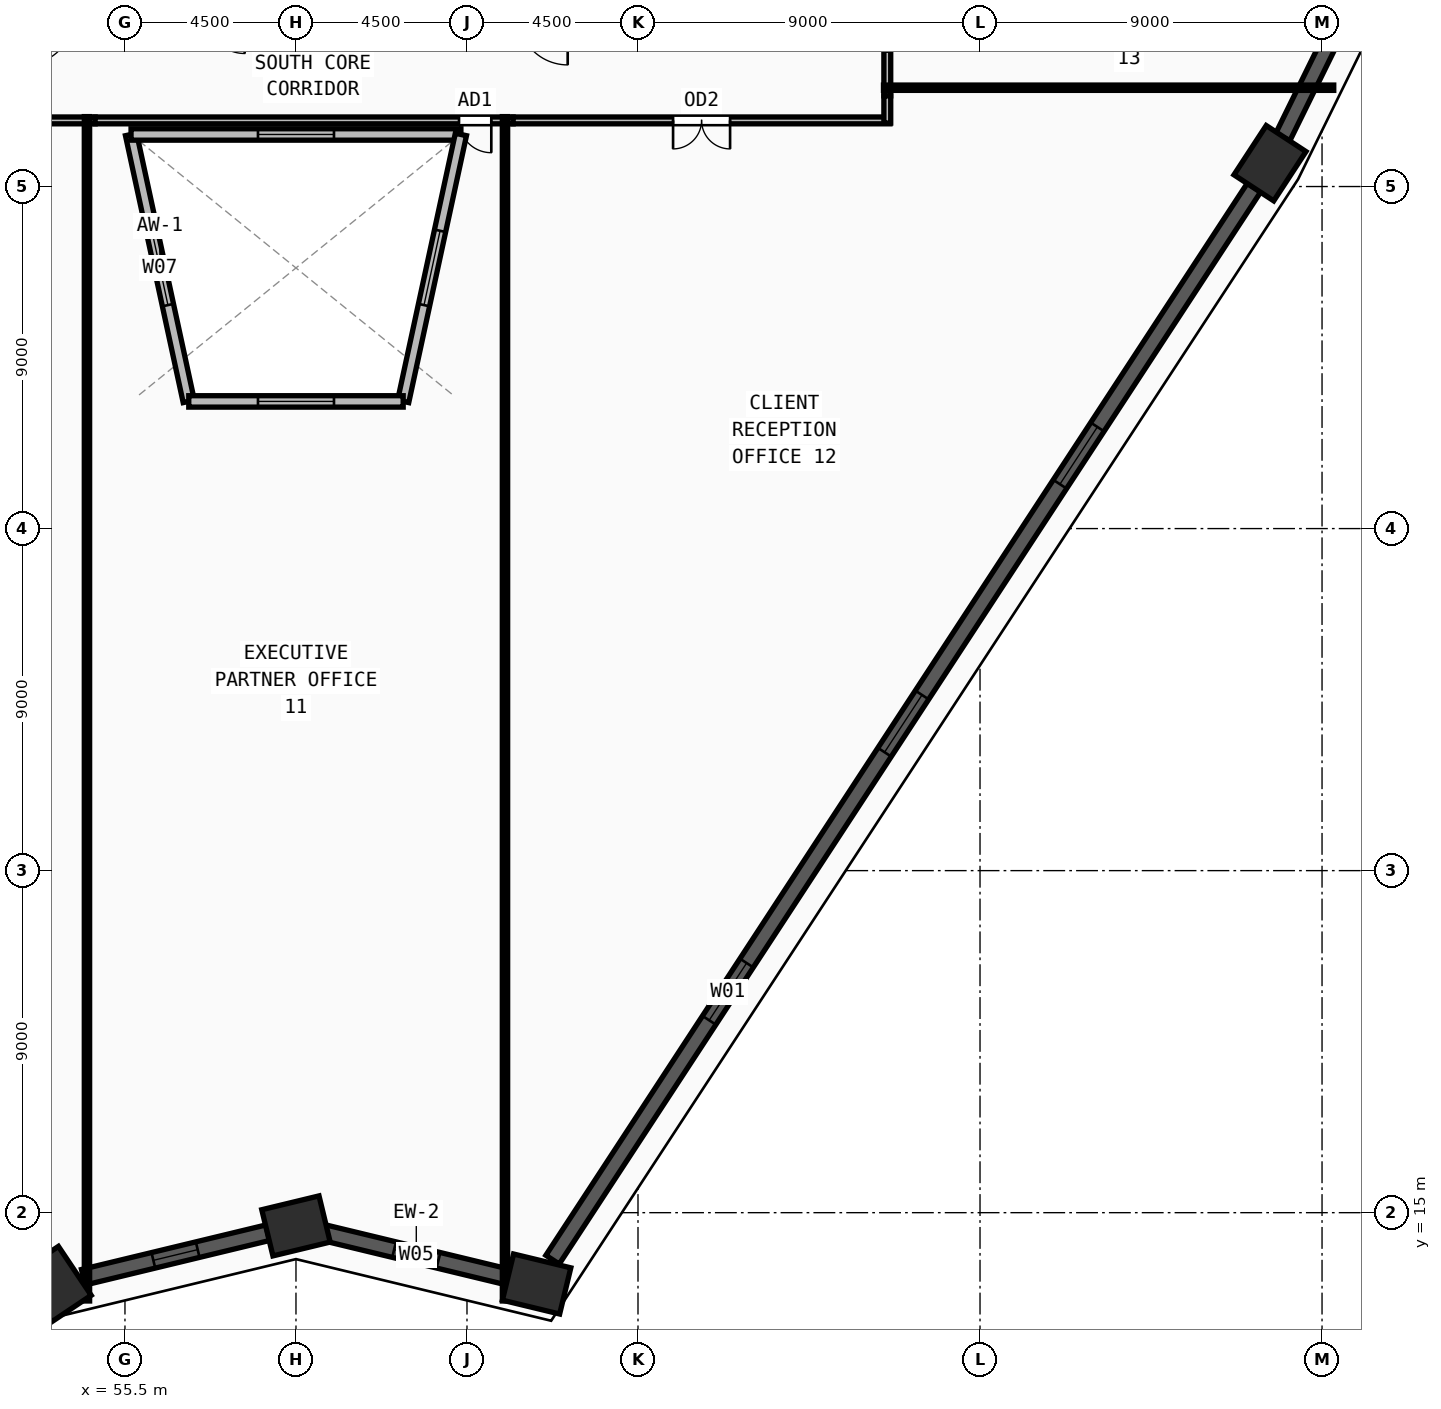
"""IFC4 building model, lengths in metres.
Left out: names, types, materials, properties, quantities, classifications, styles, units other than length and angle.
Written with IfcOpenShell. Run it as: python <this file> out.ifc"""

import sys

from ifc_helpers import new_model, si_unit, direction, frame, frame_2d, origin, origin_2d, place, context, subcontext, project, spatial, rectangle, extrude, source, transform, mapped, element, fill, save


model = new_model("IFC4")
c1 = context("Model", 3, precision=1e-05, world=origin(), true_north=direction((0.0, 1.0)))
c2 = subcontext(c1, "Body", "Model", "MODEL_VIEW")
j1 = project(units=[si_unit("LENGTHUNIT", "METRE"), si_unit("PLANEANGLEUNIT", "RADIAN")], contexts=[c1])
p1 = place(None, origin())
s1 = spatial("IfcSite", under=j1, at=p1, CompositionType="ELEMENT")
p2 = place(p1, origin())
s2 = spatial("IfcBuilding", under=s1, at=p2, CompositionType="ELEMENT")
p3 = place(p2, frame((0.0, 0.0, 51.75)))
s3 = spatial("IfcBuildingStorey", under=s2, at=p3, CompositionType="ELEMENT", Elevation=51.75)
m1 = source(origin(), c2, "Body", "SweptSolid", [
    extrude(rectangle(XDim=1.55, YDim=1.25, at=origin_2d()), origin(), (0.0, 0.0, 1.0), 3.75),
])
for number, where, z_axis, x_axis in (
    (1, (53.661, 13.121, 0.0), (0.0, 0.0, 1.0), (-0.557, 0.831, 0.0)),
    (2, (85.63, 42.614, 0.0), (0.0, 0.0, 1.0), (0.548, 0.837, 0.0)),
    (3, (66.332, 13.123, 0.0), (0.0, 0.0, 1.0), (-0.972, 0.235, 0.0)),
    (4, (60.0, 14.652, 0.0), (0.0, 0.0, 1.0), (0.972, 0.235, 0.0)),
):
    element("IfcColumn", number, at=place(p3, frame(where, z_axis=z_axis, x_axis=x_axis)), inside=s3, PredefinedType="COLUMN", context=c2, shape_type="MappedRepresentation", body=[
        mapped(m1, transform((0.0, 0.0, 0.0), x_axis=(1.0, 0.0, 0.0), y_axis=(0.0, 1.0, 0.0), z_axis=(0.0, 0.0, 1.0), scale=1.0)),
    ])
p4 = place(p3, frame((60.744, 14.472, 0.0), z_axis=(0.0, 0.0, 1.0), x_axis=(0.972095694159, -0.234584657207, 0.0)))
e5 = element("IfcWall", 5, at=p4, inside=s3, PredefinedType="SOLIDWALL", context=c2, shape_type="SweptSolid", body=[
    extrude(rectangle(XDim=4.983, YDim=0.42, at=frame_2d((2.492, 0.0))), origin(), (0.0, 0.0, 1.0), 3.57),
])
m2 = source(origin(), c2, "Body", "SweptSolid", [
    extrude(rectangle(XDim=1.2, YDim=1.9, at=frame_2d((0.6, 0.95))), frame((0.0, 0.22, 0.0), z_axis=(0.0, -1.0, 0.0), x_axis=(1.0, 0.0, 0.0)), (0.0, 0.0, 1.0), 0.44),
])
p5 = place(p4, frame((1.892, 0.0, 0.55)))
e6 = element("IfcOpeningElement", 6, at=p5, cuts=e5, PredefinedType="OPENING", context=c2, shape_type="MappedRepresentation", body=[
    mapped(m2, transform((0.0, 0.0, 0.0), x_axis=(1.0, 0.0, 0.0), y_axis=(0.0, 1.0, 0.0), z_axis=(0.0, 0.0, 1.0), scale=1.0)),
])
p6 = place(p3, frame((66.751, 13.763, 0.0), z_axis=(0.0, 0.0, 1.0), x_axis=(0.547544136791, 0.836776803135, 0.0)))
e7 = element("IfcWall", 7, at=p6, inside=s3, PredefinedType="SOLIDWALL", context=c2, shape_type="SweptSolid", body=[
    extrude(rectangle(XDim=33.714, YDim=0.42, at=frame_2d((16.857, 0.0))), origin(), (0.0, 0.0, 1.0), 3.57),
])
m3 = source(origin(), c2, "Body", "SweptSolid", [
    extrude(rectangle(XDim=1.8, YDim=1.95, at=frame_2d((0.9, 0.975))), frame((0.0, 0.22, 0.0), z_axis=(0.0, -1.0, 0.0), x_axis=(1.0, 0.0, 0.0)), (0.0, 0.0, 1.0), 0.44),
])
p7 = place(p6, frame((7.528, 0.0, 0.55)))
e8 = element("IfcOpeningElement", 8, at=p7, cuts=e7, PredefinedType="OPENING", context=c2, shape_type="MappedRepresentation", body=[
    mapped(m3, transform((0.0, 0.0, 0.0), x_axis=(1.0, 0.0, 0.0), y_axis=(0.0, 1.0, 0.0), z_axis=(0.0, 0.0, 1.0), scale=1.0)),
])
p8 = place(p6, frame((15.957, 0.0, 0.55)))
e9 = element("IfcOpeningElement", 9, at=p8, cuts=e7, PredefinedType="OPENING", context=c2, shape_type="MappedRepresentation", body=[
    mapped(m3, transform((0.0, 0.0, 0.0), x_axis=(1.0, 0.0, 0.0), y_axis=(0.0, 1.0, 0.0), z_axis=(0.0, 0.0, 1.0), scale=1.0)),
])
p9 = place(p6, frame((24.385, 0.0, 0.55)))
e10 = element("IfcOpeningElement", 10, at=p9, cuts=e7, PredefinedType="OPENING", context=c2, shape_type="MappedRepresentation", body=[
    mapped(m3, transform((0.0, 0.0, 0.0), x_axis=(1.0, 0.0, 0.0), y_axis=(0.0, 1.0, 0.0), z_axis=(0.0, 0.0, 1.0), scale=1.0)),
])
p10 = place(p3, frame((85.967, 43.301, 0.0), z_axis=(0.0, 0.0, 1.0), x_axis=(0.441079786623, 0.897467894597, 0.0)))
e11 = element("IfcWall", 11, at=p10, inside=s3, PredefinedType="SOLIDWALL", context=c2, shape_type="SweptSolid", body=[
    extrude(rectangle(XDim=27.814, YDim=0.42, at=frame_2d((13.907, 0.0))), origin(), (0.0, 0.0, 1.0), 3.57),
])
p11 = place(p10, frame((6.053, 0.0, 0.55)))
e12 = element("IfcOpeningElement", 12, at=p11, cuts=e11, PredefinedType="OPENING", context=c2, shape_type="MappedRepresentation", body=[
    mapped(m3, transform((0.0, 0.0, 0.0), x_axis=(1.0, 0.0, 0.0), y_axis=(0.0, 1.0, 0.0), z_axis=(0.0, 0.0, 1.0), scale=1.0)),
])
p12 = place(p10, frame((14.557, 0.0, 0.55)))
e13 = element("IfcOpeningElement", 13, at=p12, cuts=e11, PredefinedType="OPENING", context=c2, shape_type="MappedRepresentation", body=[
    mapped(m3, transform((0.0, 0.0, 0.0), x_axis=(1.0, 0.0, 0.0), y_axis=(0.0, 1.0, 0.0), z_axis=(0.0, 0.0, 1.0), scale=1.0)),
])
p13 = place(p10, frame((19.11, 0.0, 0.55)))
e14 = element("IfcOpeningElement", 14, at=p13, cuts=e11, PredefinedType="OPENING", context=c2, shape_type="MappedRepresentation", body=[
    mapped(m3, transform((0.0, 0.0, 0.0), x_axis=(1.0, 0.0, 0.0), y_axis=(0.0, 1.0, 0.0), z_axis=(0.0, 0.0, 1.0), scale=1.0)),
])
p14 = place(p3, frame((54.405, 13.301, 0.0), z_axis=(0.0, 0.0, 1.0), x_axis=(0.972084517215, 0.234630968524, 0.0)))
e15 = element("IfcWall", 15, at=p14, inside=s3, PredefinedType="SOLIDWALL", context=c2, shape_type="SweptSolid", body=[
    extrude(rectangle(XDim=4.99, YDim=0.42, at=frame_2d((2.495, 0.0))), origin(), (0.0, 0.0, 1.0), 3.57),
])
p15 = place(p14, frame((1.895, 0.0, 0.55)))
e16 = element("IfcOpeningElement", 16, at=p15, cuts=e15, PredefinedType="OPENING", context=c2, shape_type="MappedRepresentation", body=[
    mapped(m2, transform((0.0, 0.0, 0.0), x_axis=(1.0, 0.0, 0.0), y_axis=(0.0, 1.0, 0.0), z_axis=(0.0, 0.0, 1.0), scale=1.0)),
])
p16 = place(p3, frame((57.179, 36.346, 0.0), z_axis=(0.0, 0.0, 1.0), x_axis=(-0.211373141383, 0.977405440491, 0.0)))
e17 = element("IfcWall", 17, at=p16, inside=s3, PredefinedType="SOLIDWALL", context=c2, shape_type="SweptSolid", body=[
    extrude(rectangle(XDim=7.187, YDim=0.3, at=frame_2d((3.593, 0.0))), origin(), (0.0, 0.0, 1.0), 3.57),
])
m4 = source(origin(), c2, "Body", "SweptSolid", [
    extrude(rectangle(XDim=2.0, YDim=1.9, at=frame_2d((1.0, 0.95))), frame((0.0, 0.16, 0.0), z_axis=(0.0, -1.0, 0.0), x_axis=(1.0, 0.0, 0.0)), (0.0, 0.0, 1.0), 0.32),
])
p17 = place(p16, frame((2.593, 0.0, 0.55)))
e18 = element("IfcOpeningElement", 18, at=p17, cuts=e17, PredefinedType="OPENING", context=c2, shape_type="MappedRepresentation", body=[
    mapped(m4, transform((0.0, 0.0, 0.0), x_axis=(1.0, 0.0, 0.0), y_axis=(0.0, 1.0, 0.0), z_axis=(0.0, 0.0, 1.0), scale=1.0)),
])
p18 = place(p3, frame((55.66, 43.37, 0.0), z_axis=(0.0, 0.0, 1.0), x_axis=(1.0, 0.0, 0.0)))
e19 = element("IfcWall", 19, at=p18, inside=s3, PredefinedType="SOLIDWALL", context=c2, shape_type="SweptSolid", body=[
    extrude(rectangle(XDim=8.68, YDim=0.3, at=frame_2d((4.34, 0.0))), origin(), (0.0, 0.0, 1.0), 3.57),
])
p19 = place(p18, frame((3.34, 0.0, 0.55)))
e20 = element("IfcOpeningElement", 20, at=p19, cuts=e19, PredefinedType="OPENING", context=c2, shape_type="MappedRepresentation", body=[
    mapped(m4, transform((0.0, 0.0, 0.0), x_axis=(1.0, 0.0, 0.0), y_axis=(0.0, 1.0, 0.0), z_axis=(0.0, 0.0, 1.0), scale=1.0)),
])
p20 = place(p3, frame((64.34, 43.37, 0.0), z_axis=(0.0, 0.0, 1.0), x_axis=(-0.211373141383, -0.977405440491, 0.0)))
e21 = element("IfcWall", 21, at=p20, inside=s3, PredefinedType="SOLIDWALL", context=c2, shape_type="SweptSolid", body=[
    extrude(rectangle(XDim=7.187, YDim=0.3, at=frame_2d((3.593, 0.0))), origin(), (0.0, 0.0, 1.0), 3.57),
])
p21 = place(p20, frame((2.593, 0.0, 0.55)))
e22 = element("IfcOpeningElement", 22, at=p21, cuts=e21, PredefinedType="OPENING", context=c2, shape_type="MappedRepresentation", body=[
    mapped(m4, transform((0.0, 0.0, 0.0), x_axis=(1.0, 0.0, 0.0), y_axis=(0.0, 1.0, 0.0), z_axis=(0.0, 0.0, 1.0), scale=1.0)),
])
p22 = place(p3, frame((62.821, 36.346, 0.0), z_axis=(0.0, 0.0, 1.0), x_axis=(-1.0, 0.0, 0.0)))
e23 = element("IfcWall", 23, at=p22, inside=s3, PredefinedType="SOLIDWALL", context=c2, shape_type="SweptSolid", body=[
    extrude(rectangle(XDim=5.642, YDim=0.3, at=frame_2d((2.821, 0.0))), origin(), (0.0, 0.0, 1.0), 3.57),
])
p23 = place(p22, frame((1.821, 0.0, 0.55)))
e24 = element("IfcOpeningElement", 24, at=p23, cuts=e23, PredefinedType="OPENING", context=c2, shape_type="MappedRepresentation", body=[
    mapped(m4, transform((0.0, 0.0, 0.0), x_axis=(1.0, 0.0, 0.0), y_axis=(0.0, 1.0, 0.0), z_axis=(0.0, 0.0, 1.0), scale=1.0)),
])
p24 = place(p3, frame((54.715, 43.74, 0.0), z_axis=(0.0, 0.0, 1.0), x_axis=(-1.0, 0.0, 0.0)))
e25 = element("IfcWall", 25, at=p24, inside=s3, PredefinedType="PARTITIONING", context=c2, shape_type="SweptSolid", body=[
    extrude(rectangle(XDim=10.345, YDim=0.18, at=frame_2d((5.172, 0.0))), origin(), (0.0, 0.0, 1.0), 3.57),
])
m5 = source(origin(), c2, "Body", "SweptSolid", [
    extrude(rectangle(XDim=1.5, YDim=2.2, at=frame_2d((0.75, 1.1))), frame((0.0, 0.1, 0.0), z_axis=(0.0, -1.0, 0.0), x_axis=(1.0, 0.0, 0.0)), (0.0, 0.0, 1.0), 0.2),
])
p25 = place(p24, frame((4.423, 0.0, 0.0)))
e26 = element("IfcOpeningElement", 26, at=p25, cuts=e25, PredefinedType="OPENING", context=c2, shape_type="MappedRepresentation", body=[
    mapped(m5, transform((0.0, 0.0, 0.0), x_axis=(1.0, 0.0, 0.0), y_axis=(0.0, 1.0, 0.0), z_axis=(0.0, 0.0, 1.0), scale=1.0)),
])
p26 = place(p3, frame((65.715, 43.74, 0.0), z_axis=(0.0, 0.0, 1.0), x_axis=(-1.0, 0.0, 0.0)))
e27 = element("IfcWall", 27, at=p26, inside=s3, PredefinedType="PARTITIONING", context=c2, shape_type="SweptSolid", body=[
    extrude(rectangle(XDim=11.0, YDim=0.18, at=frame_2d((5.5, 0.0))), origin(), (0.0, 0.0, 1.0), 3.57),
])
m6 = source(origin(), c2, "Body", "SweptSolid", [
    extrude(rectangle(XDim=0.85, YDim=2.1, at=frame_2d((0.425, 1.05))), frame((0.0, 0.1, 0.0), z_axis=(0.0, -1.0, 0.0), x_axis=(1.0, 0.0, 0.0)), (0.0, 0.0, 1.0), 0.2),
])
p27 = place(p26, frame((0.575, 0.0, 0.0)))
e28 = element("IfcOpeningElement", 28, at=p27, cuts=e27, PredefinedType="OPENING", context=c2, shape_type="MappedRepresentation", body=[
    mapped(m6, transform((0.0, 0.0, 0.0), x_axis=(1.0, 0.0, 0.0), y_axis=(0.0, 1.0, 0.0), z_axis=(0.0, 0.0, 1.0), scale=1.0)),
])
p28 = place(p3, frame((75.63, 43.74, 0.0), z_axis=(0.0, 0.0, 1.0), x_axis=(-1.0, 0.0, 0.0)))
e29 = element("IfcWall", 29, at=p28, inside=s3, PredefinedType="PARTITIONING", context=c2, shape_type="SweptSolid", body=[
    extrude(rectangle(XDim=9.915, YDim=0.18, at=frame_2d((4.958, 0.0))), origin(), (0.0, 0.0, 1.0), 3.57),
])
p29 = place(p28, frame((4.207, 0.0, 0.0)))
e30 = element("IfcOpeningElement", 30, at=p29, cuts=e29, PredefinedType="OPENING", context=c2, shape_type="MappedRepresentation", body=[
    mapped(m5, transform((0.0, 0.0, 0.0), x_axis=(1.0, 0.0, 0.0), y_axis=(0.0, 1.0, 0.0), z_axis=(0.0, 0.0, 1.0), scale=1.0)),
])
p30 = place(p3, frame((75.56, 47.715, 0.0), z_axis=(0.0, 0.0, 1.0), x_axis=(0.0, -1.0, 0.0)))
e31 = element("IfcWall", 31, at=p30, inside=s3, PredefinedType="PARTITIONING", context=c2, shape_type="SweptSolid", body=[
    extrude(rectangle(XDim=3.33, YDim=0.18, at=frame_2d((1.665, 0.0))), origin(), (0.0, 0.0, 1.0), 3.57),
])
m7 = source(origin(), c2, "Body", "SweptSolid", [
    extrude(rectangle(XDim=1.0, YDim=2.2, at=frame_2d((0.5, 1.1))), frame((0.0, 0.1, 0.0), z_axis=(0.0, -1.0, 0.0), x_axis=(1.0, 0.0, 0.0)), (0.0, 0.0, 1.0), 0.2),
])
p31 = place(p30, frame((1.165, 0.0, 0.0)))
e32 = element("IfcOpeningElement", 32, at=p31, cuts=e31, PredefinedType="OPENING", context=c2, shape_type="MappedRepresentation", body=[
    mapped(m7, transform((0.0, 0.0, 0.0), x_axis=(1.0, 0.0, 0.0), y_axis=(0.0, 1.0, 0.0), z_axis=(0.0, 0.0, 1.0), scale=1.0)),
])
p32 = place(p3, frame((75.56, 44.385, 0.0), z_axis=(0.0, 0.0, 1.0), x_axis=(0.0, -1.0, 0.0)))
e33 = element("IfcWall", 33, at=p32, inside=s3, PredefinedType="PARTITIONING", context=c2, shape_type="SweptSolid", body=[
    extrude(rectangle(XDim=0.715, YDim=0.18, at=frame_2d((0.357, 0.0))), origin(), (0.0, 0.0, 1.0), 3.57),
])
p33 = place(p3, frame((75.46, 44.6, 0.0), z_axis=(0.0, 0.0, 1.0), x_axis=(1.0, 0.0, 0.0)))
e34 = element("IfcWall", 34, at=p33, inside=s3, PredefinedType="PARTITIONING", context=c2, shape_type="SweptSolid", body=[
    extrude(rectangle(XDim=11.848, YDim=0.14, at=frame_2d((5.924, 0.0))), origin(), (0.0, 0.0, 1.0), 2.705),
])
for number, where, z_axis, x_axis in (
    (35, (54.5, 43.84, 0.0), (0.0, 0.0, 1.0), (0.0, -1.0, 0.0)),
    (36, (65.5, 43.84, 0.0), (0.0, 0.0, 1.0), (0.0, -1.0, 0.0)),
):
    element("IfcWall", number, at=place(p3, frame(where, z_axis=z_axis, x_axis=x_axis)), inside=s3, PredefinedType="PARTITIONING", context=c2, shape_type="SweptSolid", body=[
        extrude(rectangle(XDim=31.164, YDim=0.14, at=frame_2d((15.582, 0.0))), origin(), (0.0, 0.0, 1.0), 3.57),
    ])
m8 = source(origin(), c2, "Body", "SweptSolid", [
    extrude(rectangle(XDim=1.2, YDim=1.9, at=frame_2d((0.6, 0.95))), frame((0.0, 0.03, 0.0), z_axis=(0.0, -1.0, 0.0), x_axis=(1.0, 0.0, 0.0)), (0.0, 0.0, 1.0), 0.06),
])
p34 = place(p5, origin())
e37 = element("IfcWindow", 37, at=p34, inside=s3, PartitioningType="SINGLE_PANEL", PredefinedType="WINDOW", context=c2, shape_type="MappedRepresentation", body=[
    mapped(m8, transform((0.0, 0.0, 0.0), x_axis=(1.0, 0.0, 0.0), y_axis=(0.0, 1.0, 0.0), z_axis=(0.0, 0.0, 1.0), scale=1.0)),
])
fill(e6, e37)
m9 = source(origin(), c2, "Body", "SweptSolid", [
    extrude(rectangle(XDim=1.8, YDim=1.95, at=frame_2d((0.9, 0.975))), frame((0.0, 0.03, 0.0), z_axis=(0.0, -1.0, 0.0), x_axis=(1.0, 0.0, 0.0)), (0.0, 0.0, 1.0), 0.06),
])
p35 = place(p7, origin())
e38 = element("IfcWindow", 38, at=p35, inside=s3, PartitioningType="DOUBLE_PANEL_VERTICAL", PredefinedType="WINDOW", context=c2, shape_type="MappedRepresentation", body=[
    mapped(m9, transform((0.0, 0.0, 0.0), x_axis=(1.0, 0.0, 0.0), y_axis=(0.0, 1.0, 0.0), z_axis=(0.0, 0.0, 1.0), scale=1.0)),
])
fill(e8, e38)
p36 = place(p8, origin())
e39 = element("IfcWindow", 39, at=p36, inside=s3, PartitioningType="DOUBLE_PANEL_VERTICAL", PredefinedType="WINDOW", context=c2, shape_type="MappedRepresentation", body=[
    mapped(m9, transform((0.0, 0.0, 0.0), x_axis=(1.0, 0.0, 0.0), y_axis=(0.0, 1.0, 0.0), z_axis=(0.0, 0.0, 1.0), scale=1.0)),
])
fill(e9, e39)
p37 = place(p9, origin())
e40 = element("IfcWindow", 40, at=p37, inside=s3, PartitioningType="DOUBLE_PANEL_VERTICAL", PredefinedType="WINDOW", context=c2, shape_type="MappedRepresentation", body=[
    mapped(m9, transform((0.0, 0.0, 0.0), x_axis=(1.0, 0.0, 0.0), y_axis=(0.0, 1.0, 0.0), z_axis=(0.0, 0.0, 1.0), scale=1.0)),
])
fill(e10, e40)
p38 = place(p15, origin())
e41 = element("IfcWindow", 41, at=p38, inside=s3, PartitioningType="SINGLE_PANEL", PredefinedType="WINDOW", context=c2, shape_type="MappedRepresentation", body=[
    mapped(m8, transform((0.0, 0.0, 0.0), x_axis=(1.0, 0.0, 0.0), y_axis=(0.0, 1.0, 0.0), z_axis=(0.0, 0.0, 1.0), scale=1.0)),
])
fill(e16, e41)
m10 = source(origin(), c2, "Body", "SweptSolid", [
    extrude(rectangle(XDim=2.0, YDim=1.9, at=frame_2d((1.0, 0.95))), frame((0.0, 0.03, 0.0), z_axis=(0.0, -1.0, 0.0), x_axis=(1.0, 0.0, 0.0)), (0.0, 0.0, 1.0), 0.06),
])
p39 = place(p17, origin())
e42 = element("IfcWindow", 42, at=p39, inside=s3, PartitioningType="DOUBLE_PANEL_VERTICAL", PredefinedType="WINDOW", context=c2, shape_type="MappedRepresentation", body=[
    mapped(m10, transform((0.0, 0.0, 0.0), x_axis=(1.0, 0.0, 0.0), y_axis=(0.0, 1.0, 0.0), z_axis=(0.0, 0.0, 1.0), scale=1.0)),
])
fill(e18, e42)
p40 = place(p19, origin())
e43 = element("IfcWindow", 43, at=p40, inside=s3, PartitioningType="DOUBLE_PANEL_VERTICAL", PredefinedType="WINDOW", context=c2, shape_type="MappedRepresentation", body=[
    mapped(m10, transform((0.0, 0.0, 0.0), x_axis=(1.0, 0.0, 0.0), y_axis=(0.0, 1.0, 0.0), z_axis=(0.0, 0.0, 1.0), scale=1.0)),
])
fill(e20, e43)
p41 = place(p21, origin())
e44 = element("IfcWindow", 44, at=p41, inside=s3, PartitioningType="DOUBLE_PANEL_VERTICAL", PredefinedType="WINDOW", context=c2, shape_type="MappedRepresentation", body=[
    mapped(m10, transform((0.0, 0.0, 0.0), x_axis=(1.0, 0.0, 0.0), y_axis=(0.0, 1.0, 0.0), z_axis=(0.0, 0.0, 1.0), scale=1.0)),
])
fill(e22, e44)
p42 = place(p23, origin())
e45 = element("IfcWindow", 45, at=p42, inside=s3, PartitioningType="DOUBLE_PANEL_VERTICAL", PredefinedType="WINDOW", context=c2, shape_type="MappedRepresentation", body=[
    mapped(m10, transform((0.0, 0.0, 0.0), x_axis=(1.0, 0.0, 0.0), y_axis=(0.0, 1.0, 0.0), z_axis=(0.0, 0.0, 1.0), scale=1.0)),
])
fill(e24, e45)
m11 = source(origin(), c2, "Body", "SweptSolid", [
    extrude(rectangle(XDim=0.85, YDim=2.1, at=frame_2d((0.425, 1.05))), frame((0.0, 0.025, 0.0), z_axis=(0.0, -1.0, 0.0), x_axis=(1.0, 0.0, 0.0)), (0.0, 0.0, 1.0), 0.05),
])
p43 = place(p27, origin())
e46 = element("IfcDoor", 46, at=p43, inside=s3, OperationType="SINGLE_SWING_LEFT", PredefinedType="DOOR", context=c2, shape_type="MappedRepresentation", body=[
    mapped(m11, transform((0.0, 0.0, 0.0), x_axis=(1.0, 0.0, 0.0), y_axis=(0.0, 1.0, 0.0), z_axis=(0.0, 0.0, 1.0), scale=1.0)),
])
fill(e28, e46)
m12 = source(origin(), c2, "Body", "SweptSolid", [
    extrude(rectangle(XDim=1.5, YDim=2.2, at=frame_2d((0.75, 1.1))), frame((0.0, 0.025, 0.0), z_axis=(0.0, -1.0, 0.0), x_axis=(1.0, 0.0, 0.0)), (0.0, 0.0, 1.0), 0.05),
])
p44 = place(p29, origin())
e47 = element("IfcDoor", 47, at=p44, inside=s3, OperationType="DOUBLE_DOOR_SINGLE_SWING", PredefinedType="DOOR", context=c2, shape_type="MappedRepresentation", body=[
    mapped(m12, transform((0.0, 0.0, 0.0), x_axis=(1.0, 0.0, 0.0), y_axis=(0.0, 1.0, 0.0), z_axis=(0.0, 0.0, 1.0), scale=1.0)),
])
fill(e30, e47)
save(model, sys.argv[1])
